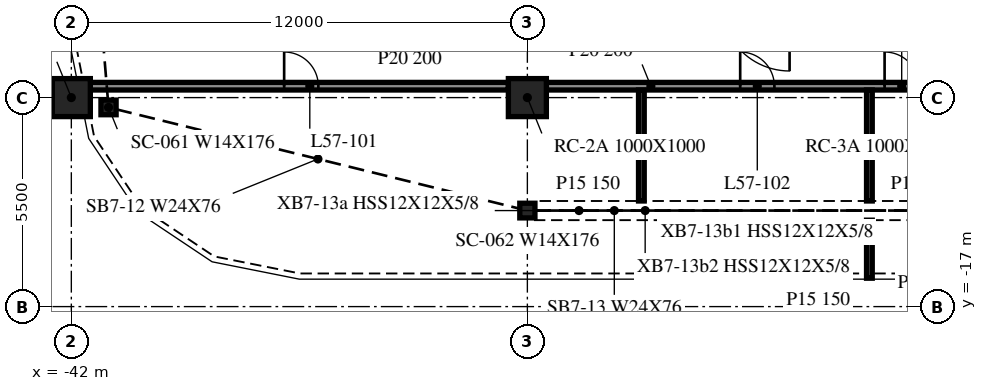
"""IFC4 building model, lengths in metres.
Left out: names, types, materials, properties, quantities, classifications, styles, units other than length and angle.
Written with IfcOpenShell. Run it as: python <this file> out.ifc"""

import sys

from ifc_helpers import new_model, si_unit, direction, frame, frame_2d, origin, origin_2d, place, context, subcontext, project, spatial, rectangle, i_section, extrude, element, fill, save


model = new_model("IFC4")
c1 = context("Model", 3, precision=1e-05, world=origin(), true_north=direction((0.0, 1.0)))
c2 = subcontext(c1, "Body", "Model", "MODEL_VIEW")
j1 = project(units=[si_unit("LENGTHUNIT", "METRE"), si_unit("PLANEANGLEUNIT", "RADIAN")], contexts=[c1])
p1 = place(None, origin())
s1 = spatial("IfcSite", under=j1, at=p1, CompositionType="ELEMENT")
p2 = place(p1, origin())
s2 = spatial("IfcBuilding", under=s1, at=p2, CompositionType="ELEMENT")
p3 = place(p2, frame((0.0, 0.0, 236.2)))
s3 = spatial("IfcBuildingStorey", under=s2, at=p3, CompositionType="ELEMENT", Elevation=236.2)
for number, where, z_axis, x_axis in (
    (1, (-42.0, -11.5, -0.34), (0.0, 0.0, 1.0), (1.0, 0.0, 0.0)),
    (2, (-30.0, -11.5, -0.34), (0.0, 0.0, 1.0), (1.0, 0.0, 0.0)),
):
    element("IfcColumn", number, at=place(p3, frame(where, z_axis=z_axis, x_axis=x_axis)), inside=s3, PredefinedType="COLUMN", context=c2, shape_type="SweptSolid", body=[
        extrude(rectangle(XDim=1.0, YDim=1.0, at=origin_2d()), origin(), (0.0, 0.0, 1.0), 3.8),
    ])
for number, where, z_axis, x_axis in (
    (3, (-41.021, -11.758, -0.34), (0.0, 0.0, 1.0), (1.0, 0.0, 0.0)),
    (4, (-30.0, -14.473, -0.34), (0.0, 0.0, 1.0), (1.0, 0.0, 0.0)),
):
    element("IfcColumn", number, at=place(p3, frame(where, z_axis=z_axis, x_axis=x_axis)), inside=s3, PredefinedType="COLUMN", context=c2, shape_type="SweptSolid", body=[
        extrude(i_section(OverallWidth=0.399, OverallDepth=0.386, WebThickness=0.021, FlangeThickness=0.033, at=origin_2d()), origin(), (0.0, 0.0, 1.0), 3.8),
    ])
p4 = place(p3, frame((-41.5, -11.2, 0.0), z_axis=(0.0, 0.0, 1.0), x_axis=(1.0, 0.0, 0.0)))
e5 = element("IfcWall", 5, at=p4, inside=s3, PredefinedType="PARTITIONING", context=c2, shape_type="SweptSolid", body=[
    extrude(rectangle(XDim=11.0, YDim=0.2, at=frame_2d((5.5, 0.0))), origin(), (0.0, 0.0, 1.0), 3.46),
])
p5 = place(p4, frame((5.1, 0.0, 0.0)))
e6 = element("IfcOpeningElement", 6, at=p5, cuts=e5, PredefinedType="OPENING", context=c2, shape_type="SweptSolid", body=[
    extrude(rectangle(XDim=0.9, YDim=2.1, at=frame_2d((0.45, 1.05))), frame((0.0, 0.11, 0.0), z_axis=(0.0, -1.0, 0.0), x_axis=(1.0, 0.0, 0.0)), (0.0, 0.0, 1.0), 0.22),
])
p6 = place(p3, frame((-29.5, -11.2, 0.0), z_axis=(0.0, 0.0, 1.0), x_axis=(1.0, 0.0, 0.0)))
e7 = element("IfcWall", 7, at=p6, inside=s3, PredefinedType="PARTITIONING", context=c2, shape_type="SweptSolid", body=[
    extrude(rectangle(XDim=11.0, YDim=0.2, at=frame_2d((5.5, 0.0))), origin(), (0.0, 0.0, 1.0), 3.46),
])
p7 = place(p6, frame((5.1, 0.0, 0.0)))
e8 = element("IfcOpeningElement", 8, at=p7, cuts=e7, PredefinedType="OPENING", context=c2, shape_type="SweptSolid", body=[
    extrude(rectangle(XDim=0.9, YDim=2.1, at=frame_2d((0.45, 1.05))), frame((0.0, 0.11, 0.0), z_axis=(0.0, -1.0, 0.0), x_axis=(1.0, 0.0, 0.0)), (0.0, 0.0, 1.0), 0.22),
])
p8 = place(p6, frame((8.9, 0.0, 0.0)))
e9 = element("IfcOpeningElement", 9, at=p8, cuts=e7, PredefinedType="OPENING", context=c2, shape_type="SweptSolid", body=[
    extrude(rectangle(XDim=0.9, YDim=2.1, at=frame_2d((0.45, 1.05))), frame((0.0, 0.11, 0.0), z_axis=(0.0, -1.0, 0.0), x_axis=(1.0, 0.0, 0.0)), (0.0, 0.0, 1.0), 0.22),
])
p9 = place(p3, frame((-27.0, -14.221, 0.0), z_axis=(0.0, 0.0, 1.0), x_axis=(0.0, 1.0, 0.0)))
e10 = element("IfcWall", 10, at=p9, inside=s3, PredefinedType="PARTITIONING", context=c2, shape_type="SweptSolid", body=[
    extrude(rectangle(XDim=2.921, YDim=0.15, at=frame_2d((1.46, 0.0))), origin(), (0.0, 0.0, 1.0), 3.46),
])
p10 = place(p3, frame((-21.0, -16.253, 0.0), z_axis=(0.0, 0.0, 1.0), x_axis=(0.0, 1.0, 0.0)))
e11 = element("IfcWall", 11, at=p10, inside=s3, PredefinedType="PARTITIONING", context=c2, shape_type="SweptSolid", body=[
    extrude(rectangle(XDim=1.528, YDim=0.15, at=frame_2d((0.764, 0.0))), origin(), (0.0, 0.0, 1.0), 3.46),
])
p11 = place(p3, frame((-21.0, -14.221, 0.0), z_axis=(0.0, 0.0, 1.0), x_axis=(0.0, 1.0, 0.0)))
e12 = element("IfcWall", 12, at=p11, inside=s3, PredefinedType="PARTITIONING", context=c2, shape_type="SweptSolid", body=[
    extrude(rectangle(XDim=2.921, YDim=0.15, at=frame_2d((1.46, 0.0))), origin(), (0.0, 0.0, 1.0), 3.46),
])
p12 = place(p5, origin())
e13 = element("IfcDoor", 13, at=p12, inside=s3, OperationType="SINGLE_SWING_LEFT", PredefinedType="DOOR", context=c2, shape_type="SweptSolid", body=[
    extrude(rectangle(XDim=0.9, YDim=2.1, at=frame_2d((0.45, 1.05))), frame((0.0, 0.025, 0.0), z_axis=(0.0, -1.0, 0.0), x_axis=(1.0, 0.0, 0.0)), (0.0, 0.0, 1.0), 0.05),
])
fill(e6, e13)
p13 = place(p7, origin())
e14 = element("IfcDoor", 14, at=p13, inside=s3, OperationType="SINGLE_SWING_LEFT", PredefinedType="DOOR", context=c2, shape_type="SweptSolid", body=[
    extrude(rectangle(XDim=0.9, YDim=2.1, at=frame_2d((0.45, 1.05))), frame((0.0, 0.025, 0.0), z_axis=(0.0, -1.0, 0.0), x_axis=(1.0, 0.0, 0.0)), (0.0, 0.0, 1.0), 0.05),
])
fill(e8, e14)
p14 = place(p8, origin())
e15 = element("IfcDoor", 15, at=p14, inside=s3, OperationType="SINGLE_SWING_LEFT", PredefinedType="DOOR", context=c2, shape_type="SweptSolid", body=[
    extrude(rectangle(XDim=0.9, YDim=2.1, at=frame_2d((0.45, 1.05))), frame((0.0, 0.025, 0.0), z_axis=(0.0, -1.0, 0.0), x_axis=(1.0, 0.0, 0.0)), (0.0, 0.0, 1.0), 0.05),
])
fill(e9, e15)
save(model, sys.argv[1])
